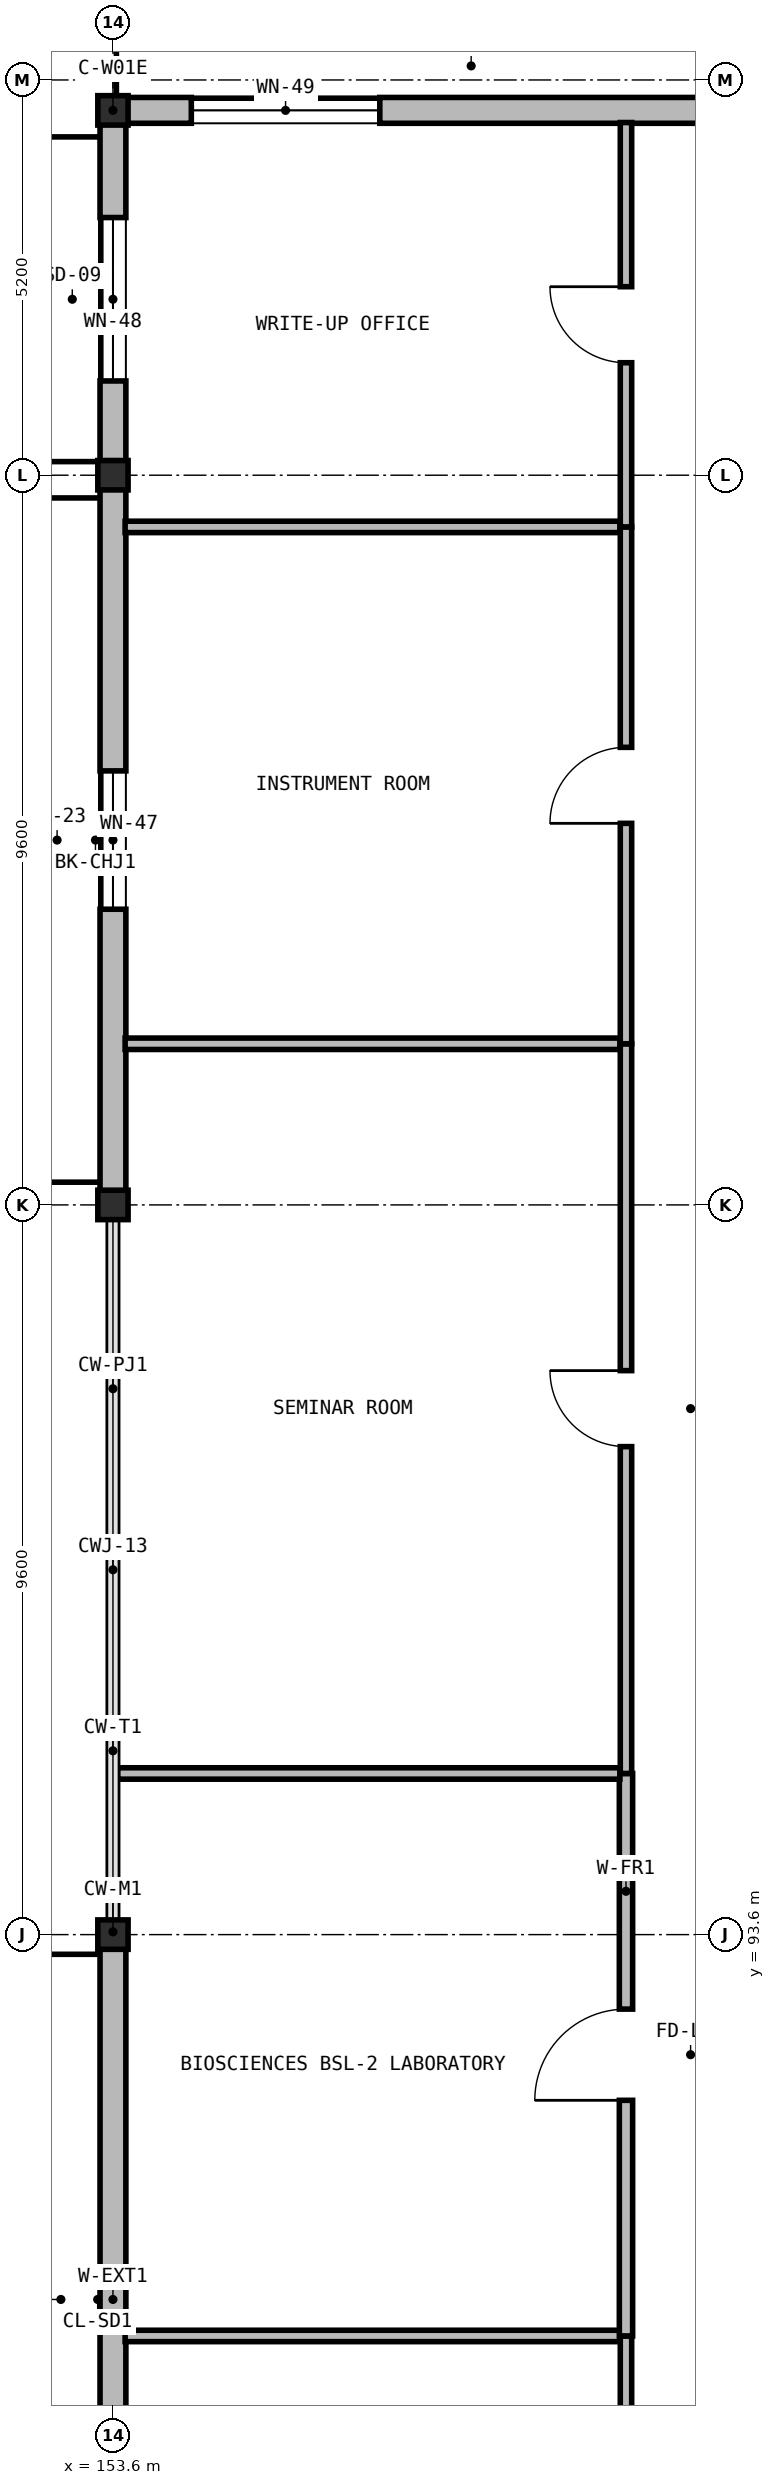
"""IFC4 building model, lengths in metres.
Left out: names, types, materials, properties, quantities, classifications, styles, units other than length and angle.
Written with IfcOpenShell. Run it as: python <this file> out.ifc"""

import sys

from ifc_helpers import new_model, si_unit, direction, frame, frame_2d, origin, origin_2d, place, context, subcontext, project, spatial, rectangle, i_section, extrude, element, fill, save


model = new_model("IFC4")
c1 = context("Model", 3, precision=1e-05, world=origin(), true_north=direction((0.0, 1.0)))
c2 = subcontext(c1, "Body", "Model", "MODEL_VIEW")
j1 = project(units=[si_unit("LENGTHUNIT", "METRE"), si_unit("PLANEANGLEUNIT", "RADIAN")], contexts=[c1])
p1 = place(None, origin())
s1 = spatial("IfcSite", under=j1, at=p1, CompositionType="ELEMENT")
p2 = place(p1, origin())
s2 = spatial("IfcBuilding", under=s1, at=p2, CompositionType="ELEMENT")
p3 = place(p2, origin())
s3 = spatial("IfcBuildingStorey", under=s2, at=p3, CompositionType="ELEMENT", Elevation=0.0)
for number, where, z_axis, x_axis in (
    (1, (153.6, 93.6, 0.0), (0.0, 0.0, 1.0), (1.0, 0.0, 0.0)),
    (2, (153.6, 103.2, 0.0), (0.0, 0.0, 1.0), (1.0, 0.0, 0.0)),
    (3, (153.6, 112.8, 0.0), (0.0, 0.0, 1.0), (1.0, 0.0, 0.0)),
    (4, (153.6, 117.6, 0.0), (0.0, 0.0, 1.0), (1.0, 0.0, 0.0)),
):
    element("IfcColumn", number, at=place(p3, frame(where, z_axis=z_axis, x_axis=x_axis)), inside=s3, PredefinedType="COLUMN", context=c2, shape_type="SweptSolid", body=[
        extrude(i_section(OverallWidth=0.398, OverallDepth=0.387, WebThickness=0.024, FlangeThickness=0.039, at=origin_2d()), origin(), (0.0, 0.0, 1.0), 5.25),
    ])
p4 = place(p3, frame((153.6, 84.004, 0.0), z_axis=(0.0, 0.0, 1.0), x_axis=(0.0, 1.0, 0.0)))
e5 = element("IfcWall", 5, at=p4, inside=s3, PredefinedType="SOLIDWALL", context=c2, shape_type="SweptSolid", body=[
    extrude(rectangle(XDim=9.592, YDim=0.34, at=frame_2d((4.796, 0.0))), origin(), (0.0, 0.0, 1.0), 4.593),
])
p5 = place(p3, frame((153.6, 103.204, 0.0), z_axis=(0.0, 0.0, 1.0), x_axis=(0.0, 1.0, 0.0)))
e6 = element("IfcWall", 6, at=p5, inside=s3, PredefinedType="SOLIDWALL", context=c2, shape_type="SweptSolid", body=[
    extrude(rectangle(XDim=9.592, YDim=0.34, at=frame_2d((4.796, 0.0))), origin(), (0.0, 0.0, 1.0), 4.546),
])
p6 = place(p5, frame((3.886, 0.0, 0.95)))
e7 = element("IfcOpeningElement", 7, at=p6, cuts=e6, PredefinedType="OPENING", context=c2, shape_type="SweptSolid", body=[
    extrude(rectangle(XDim=1.82, YDim=1.65, at=frame_2d((0.91, 0.825))), frame((0.0, 0.18, 0.0), z_axis=(0.0, -1.0, 0.0), x_axis=(1.0, 0.0, 0.0)), (0.0, 0.0, 1.0), 0.36),
])
p7 = place(p3, frame((153.6, 112.804, 0.0), z_axis=(0.0, 0.0, 1.0), x_axis=(0.0, 1.0, 0.0)))
e8 = element("IfcWall", 8, at=p7, inside=s3, PredefinedType="SOLIDWALL", context=c2, shape_type="SweptSolid", body=[
    extrude(rectangle(XDim=4.622, YDim=0.34, at=frame_2d((2.311, 0.0))), origin(), (0.0, 0.0, 1.0), 4.546),
])
p8 = place(p7, frame((1.236, 0.0, 0.95)))
e9 = element("IfcOpeningElement", 9, at=p8, cuts=e8, PredefinedType="OPENING", context=c2, shape_type="SweptSolid", body=[
    extrude(rectangle(XDim=2.15, YDim=2.05, at=frame_2d((1.075, 1.025))), frame((0.0, 0.18, 0.0), z_axis=(0.0, -1.0, 0.0), x_axis=(1.0, 0.0, 0.0)), (0.0, 0.0, 1.0), 0.36),
])
p9 = place(p3, frame((153.43, 117.6, 0.0), z_axis=(0.0, 0.0, 1.0), x_axis=(1.0, 0.0, 0.0)))
e10 = element("IfcWall", 10, at=p9, inside=s3, PredefinedType="SOLIDWALL", context=c2, shape_type="SweptSolid", body=[
    extrude(rectangle(XDim=9.766, YDim=0.34, at=frame_2d((4.883, 0.0))), origin(), (0.0, 0.0, 1.0), 4.537),
])
p10 = place(p9, frame((1.201, 0.0, 0.95)))
e11 = element("IfcOpeningElement", 11, at=p10, cuts=e10, PredefinedType="OPENING", context=c2, shape_type="SweptSolid", body=[
    extrude(rectangle(XDim=2.48, YDim=1.97, at=frame_2d((1.24, 0.985))), frame((0.0, 0.18, 0.0), z_axis=(0.0, -1.0, 0.0), x_axis=(1.0, 0.0, 0.0)), (0.0, 0.0, 1.0), 0.36),
])
p11 = place(p3, frame((160.35, 80.12, 0.0), z_axis=(0.0, 0.0, 1.0), x_axis=(0.0, 1.0, 0.0)))
e12 = element("IfcWall", 12, at=p11, inside=s3, PredefinedType="PARTITIONING", context=c2, shape_type="SweptSolid", body=[
    extrude(rectangle(XDim=8.2, YDim=0.15, at=frame_2d((4.1, 0.0))), origin(), (0.0, 0.0, 1.0), 4.93),
])
p12 = place(p11, frame((5.03, 0.0, 0.0)))
e13 = element("IfcOpeningElement", 13, at=p12, cuts=e12, PredefinedType="OPENING", context=c2, shape_type="SweptSolid", body=[
    extrude(rectangle(XDim=1.0, YDim=2.2, at=frame_2d((0.5, 1.1))), frame((0.0, 0.085, 0.0), z_axis=(0.0, -1.0, 0.0), x_axis=(1.0, 0.0, 0.0)), (0.0, 0.0, 1.0), 0.17),
])
p13 = place(p3, frame((153.76, 88.32, 0.0), z_axis=(0.0, 0.0, 1.0), x_axis=(1.0, 0.0, 0.0)))
e14 = element("IfcWall", 14, at=p13, inside=s3, PredefinedType="PARTITIONING", context=c2, shape_type="SweptSolid", body=[
    extrude(rectangle(XDim=6.51, YDim=0.15, at=frame_2d((3.255, 0.0))), origin(), (0.0, 0.0, 1.0), 4.93),
])
p14 = place(p3, frame((160.35, 88.32, 0.0), z_axis=(0.0, 0.0, 1.0), x_axis=(0.0, 1.0, 0.0)))
e15 = element("IfcWall", 15, at=p14, inside=s3, PredefinedType="PARTITIONING", context=c2, shape_type="SweptSolid", body=[
    extrude(rectangle(XDim=7.4, YDim=0.175, at=frame_2d((3.7, 0.0))), origin(), (0.0, 0.0, 1.0), 4.93),
])
p15 = place(p14, frame((3.1, 0.0, 0.0)))
e16 = element("IfcOpeningElement", 16, at=p15, cuts=e15, PredefinedType="OPENING", context=c2, shape_type="SweptSolid", body=[
    extrude(rectangle(XDim=1.2, YDim=2.2, at=frame_2d((0.6, 1.1))), frame((0.0, 0.097, 0.0), z_axis=(0.0, -1.0, 0.0), x_axis=(1.0, 0.0, 0.0)), (0.0, 0.0, 1.0), 0.195),
])
p16 = place(p3, frame((153.66, 95.72, 0.0), z_axis=(0.0, 0.0, 1.0), x_axis=(1.0, 0.0, 0.0)))
e17 = element("IfcWall", 17, at=p16, inside=s3, PredefinedType="PARTITIONING", context=c2, shape_type="SweptSolid", body=[
    extrude(rectangle(XDim=6.61, YDim=0.15, at=frame_2d((3.305, 0.0))), origin(), (0.0, 0.0, 1.0), 4.93),
])
p17 = place(p3, frame((160.35, 95.72, 0.0), z_axis=(0.0, 0.0, 1.0), x_axis=(0.0, 1.0, 0.0)))
e18 = element("IfcWall", 18, at=p17, inside=s3, PredefinedType="PARTITIONING", context=c2, shape_type="SweptSolid", body=[
    extrude(rectangle(XDim=9.6, YDim=0.15, at=frame_2d((4.8, 0.0))), origin(), (0.0, 0.0, 1.0), 4.93),
])
p18 = place(p17, frame((4.3, 0.0, 0.0)))
e19 = element("IfcOpeningElement", 19, at=p18, cuts=e18, PredefinedType="OPENING", context=c2, shape_type="SweptSolid", body=[
    extrude(rectangle(XDim=1.0, YDim=2.2, at=frame_2d((0.5, 1.1))), frame((0.0, 0.085, 0.0), z_axis=(0.0, -1.0, 0.0), x_axis=(1.0, 0.0, 0.0)), (0.0, 0.0, 1.0), 0.17),
])
p19 = place(p3, frame((153.76, 105.32, 0.0), z_axis=(0.0, 0.0, 1.0), x_axis=(1.0, 0.0, 0.0)))
e20 = element("IfcWall", 20, at=p19, inside=s3, PredefinedType="PARTITIONING", context=c2, shape_type="SweptSolid", body=[
    extrude(rectangle(XDim=6.51, YDim=0.15, at=frame_2d((3.255, 0.0))), origin(), (0.0, 0.0, 1.0), 4.93),
])
p20 = place(p3, frame((160.35, 105.32, 0.0), z_axis=(0.0, 0.0, 1.0), x_axis=(0.0, 1.0, 0.0)))
e21 = element("IfcWall", 21, at=p20, inside=s3, PredefinedType="PARTITIONING", context=c2, shape_type="SweptSolid", body=[
    extrude(rectangle(XDim=6.8, YDim=0.15, at=frame_2d((3.4, 0.0))), origin(), (0.0, 0.0, 1.0), 4.93),
])
p21 = place(p20, frame((2.9, 0.0, 0.0)))
e22 = element("IfcOpeningElement", 22, at=p21, cuts=e21, PredefinedType="OPENING", context=c2, shape_type="SweptSolid", body=[
    extrude(rectangle(XDim=1.0, YDim=2.2, at=frame_2d((0.5, 1.1))), frame((0.0, 0.085, 0.0), z_axis=(0.0, -1.0, 0.0), x_axis=(1.0, 0.0, 0.0)), (0.0, 0.0, 1.0), 0.17),
])
p22 = place(p3, frame((153.76, 112.12, 0.0), z_axis=(0.0, 0.0, 1.0), x_axis=(1.0, 0.0, 0.0)))
e23 = element("IfcWall", 23, at=p22, inside=s3, PredefinedType="PARTITIONING", context=c2, shape_type="SweptSolid", body=[
    extrude(rectangle(XDim=6.51, YDim=0.15, at=frame_2d((3.255, 0.0))), origin(), (0.0, 0.0, 1.0), 4.93),
])
p23 = place(p3, frame((160.35, 112.12, 0.0), z_axis=(0.0, 0.0, 1.0), x_axis=(0.0, 1.0, 0.0)))
e24 = element("IfcWall", 24, at=p23, inside=s3, PredefinedType="PARTITIONING", context=c2, shape_type="SweptSolid", body=[
    extrude(rectangle(XDim=5.32, YDim=0.15, at=frame_2d((2.66, 0.0))), origin(), (0.0, 0.0, 1.0), 4.93),
])
p24 = place(p23, frame((2.16, 0.0, 0.0)))
e25 = element("IfcOpeningElement", 25, at=p24, cuts=e24, PredefinedType="OPENING", context=c2, shape_type="SweptSolid", body=[
    extrude(rectangle(XDim=1.0, YDim=2.2, at=frame_2d((0.5, 1.1))), frame((0.0, 0.085, 0.0), z_axis=(0.0, -1.0, 0.0), x_axis=(1.0, 0.0, 0.0)), (0.0, 0.0, 1.0), 0.17),
])
p25 = place(p6, origin())
e26 = element("IfcWindow", 26, at=p25, inside=s3, PartitioningType="SINGLE_PANEL", PredefinedType="WINDOW", context=c2, shape_type="SweptSolid", body=[
    extrude(rectangle(XDim=1.82, YDim=1.65, at=frame_2d((0.91, 0.825))), frame((0.0, 0.03, 0.0), z_axis=(0.0, -1.0, 0.0), x_axis=(1.0, 0.0, 0.0)), (0.0, 0.0, 1.0), 0.06),
])
fill(e7, e26)
p26 = place(p8, origin())
e27 = element("IfcWindow", 27, at=p26, inside=s3, PartitioningType="SINGLE_PANEL", PredefinedType="WINDOW", context=c2, shape_type="SweptSolid", body=[
    extrude(rectangle(XDim=2.15, YDim=2.05, at=frame_2d((1.075, 1.025))), frame((0.0, 0.03, 0.0), z_axis=(0.0, -1.0, 0.0), x_axis=(1.0, 0.0, 0.0)), (0.0, 0.0, 1.0), 0.06),
])
fill(e9, e27)
p27 = place(p10, origin())
e28 = element("IfcWindow", 28, at=p27, inside=s3, PartitioningType="SINGLE_PANEL", PredefinedType="WINDOW", context=c2, shape_type="SweptSolid", body=[
    extrude(rectangle(XDim=2.48, YDim=1.97, at=frame_2d((1.24, 0.985))), frame((0.0, 0.03, 0.0), z_axis=(0.0, -1.0, 0.0), x_axis=(1.0, 0.0, 0.0)), (0.0, 0.0, 1.0), 0.06),
])
fill(e11, e28)
p28 = place(p15, origin())
e29 = element("IfcDoor", 29, at=p28, inside=s3, OperationType="SINGLE_SWING_LEFT", PredefinedType="DOOR", context=c2, shape_type="SweptSolid", body=[
    extrude(rectangle(XDim=1.2, YDim=2.2, at=frame_2d((0.6, 1.1))), frame((0.0, 0.025, 0.0), z_axis=(0.0, -1.0, 0.0), x_axis=(1.0, 0.0, 0.0)), (0.0, 0.0, 1.0), 0.05),
])
fill(e16, e29)
p29 = place(p18, origin())
e30 = element("IfcDoor", 30, at=p29, inside=s3, OperationType="SINGLE_SWING_RIGHT", PredefinedType="DOOR", context=c2, shape_type="SweptSolid", body=[
    extrude(rectangle(XDim=1.0, YDim=2.2, at=frame_2d((0.5, 1.1))), frame((0.0, 0.025, 0.0), z_axis=(0.0, -1.0, 0.0), x_axis=(1.0, 0.0, 0.0)), (0.0, 0.0, 1.0), 0.05),
])
fill(e19, e30)
p30 = place(p21, origin())
e31 = element("IfcDoor", 31, at=p30, inside=s3, OperationType="SINGLE_SWING_LEFT", PredefinedType="DOOR", context=c2, shape_type="SweptSolid", body=[
    extrude(rectangle(XDim=1.0, YDim=2.2, at=frame_2d((0.5, 1.1))), frame((0.0, 0.025, 0.0), z_axis=(0.0, -1.0, 0.0), x_axis=(1.0, 0.0, 0.0)), (0.0, 0.0, 1.0), 0.05),
])
fill(e22, e31)
p31 = place(p24, origin())
e32 = element("IfcDoor", 32, at=p31, inside=s3, OperationType="SINGLE_SWING_RIGHT", PredefinedType="DOOR", context=c2, shape_type="SweptSolid", body=[
    extrude(rectangle(XDim=1.0, YDim=2.2, at=frame_2d((0.5, 1.1))), frame((0.0, 0.025, 0.0), z_axis=(0.0, -1.0, 0.0), x_axis=(1.0, 0.0, 0.0)), (0.0, 0.0, 1.0), 0.05),
])
fill(e25, e32)
save(model, sys.argv[1])
